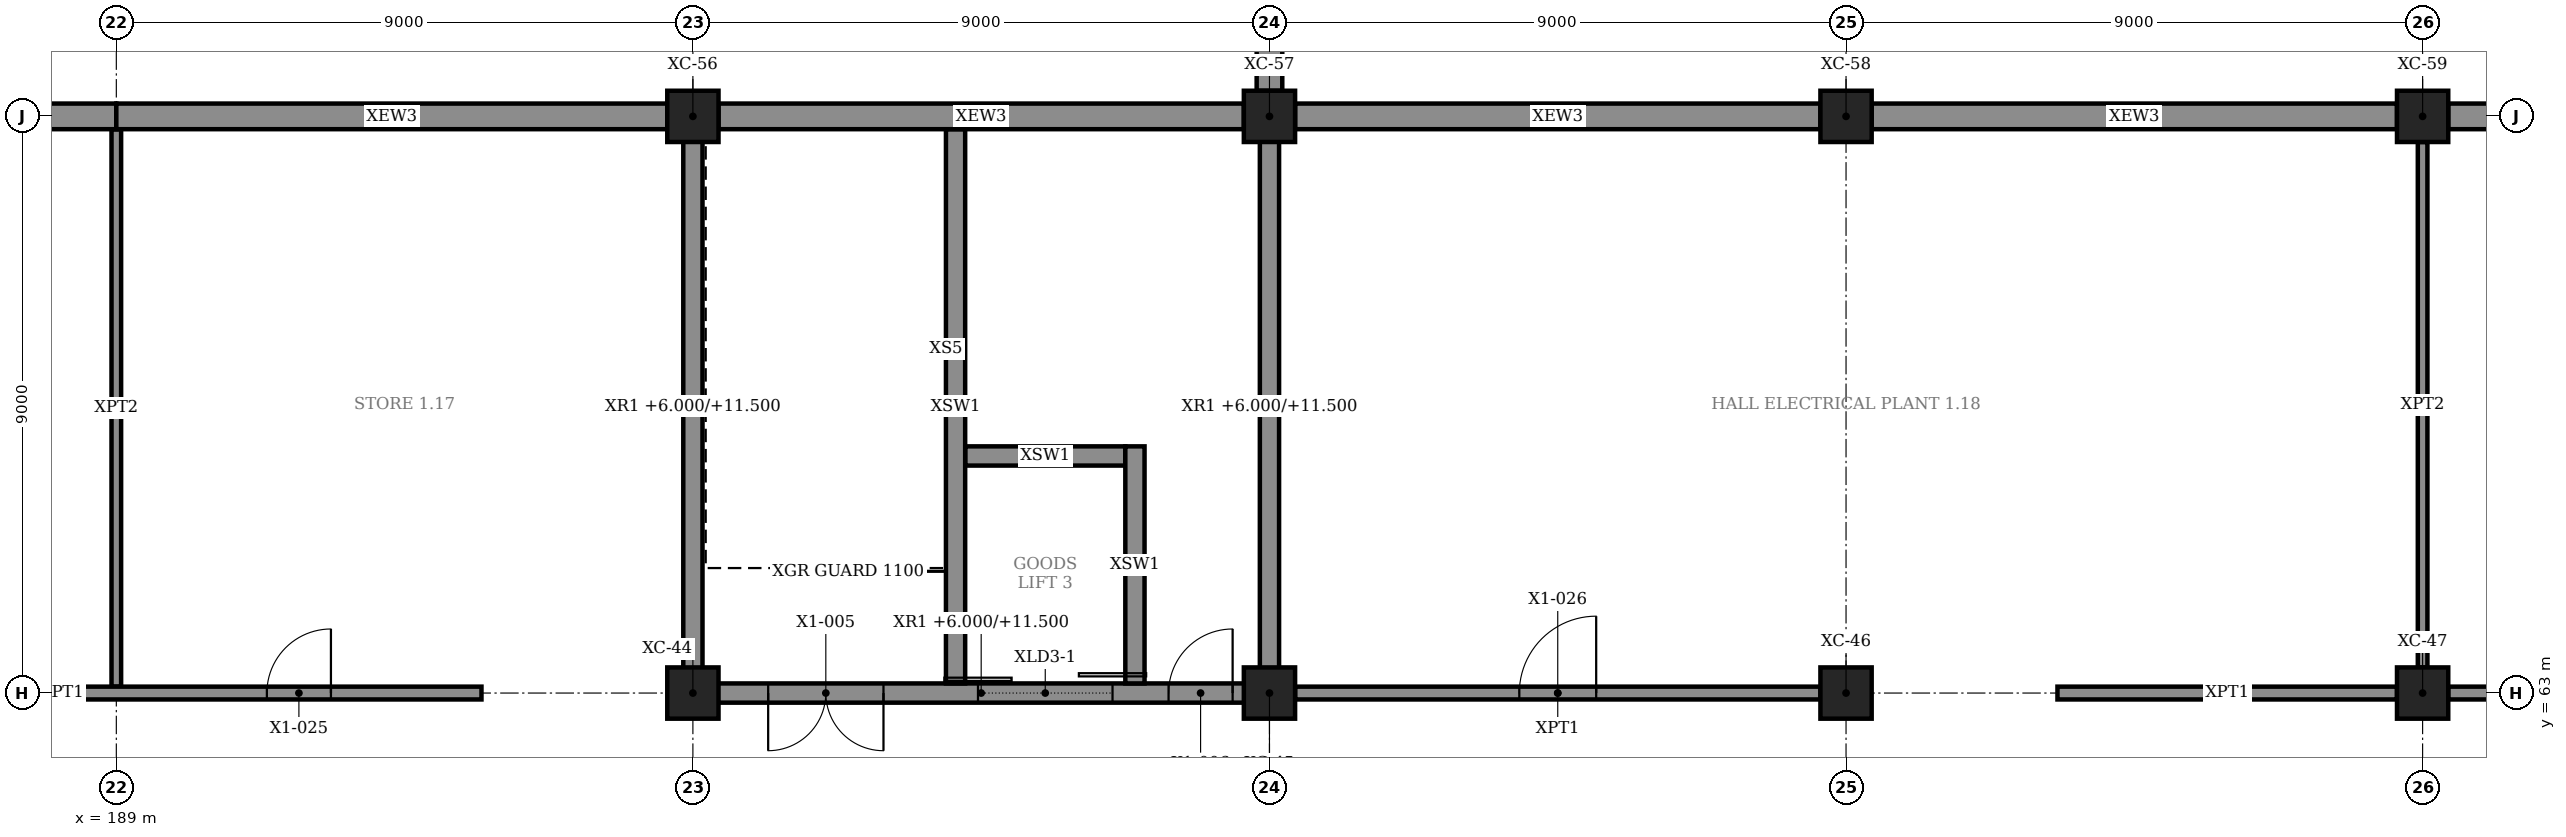
"""IFC4 building model, lengths in metres.
Left out: names, types, materials, properties, quantities, classifications, styles, units other than length and angle.
Written with IfcOpenShell. Run it as: python <this file> out.ifc"""

import sys

from ifc_helpers import new_model, si_unit, direction, frame, frame_2d, origin, origin_2d, place, context, subcontext, project, spatial, rectangle, extrude, element, fill, save


model = new_model("IFC4")
c1 = context("Model", 3, precision=1e-05, world=origin(), true_north=direction((0.0, 1.0)))
c2 = subcontext(c1, "Body", "Model", "MODEL_VIEW")
j1 = project(units=[si_unit("LENGTHUNIT", "METRE"), si_unit("PLANEANGLEUNIT", "RADIAN")], contexts=[c1])
p1 = place(None, origin())
s1 = spatial("IfcSite", under=j1, at=p1, CompositionType="ELEMENT")
p2 = place(p1, origin())
s2 = spatial("IfcBuilding", under=s1, at=p2, CompositionType="ELEMENT")
p3 = place(p2, frame((0.0, 0.0, 6.0)))
s3 = spatial("IfcBuildingStorey", under=s2, at=p3, CompositionType="ELEMENT", Elevation=6.0)
for number, where, z_axis, x_axis in (
    (1, (198.0, 63.0, 0.0), (0.0, 0.0, 1.0), (1.0, 0.0, 0.0)),
    (2, (207.0, 63.0, 0.0), (0.0, 0.0, 1.0), (1.0, 0.0, 0.0)),
    (3, (216.0, 63.0, 0.0), (0.0, 0.0, 1.0), (1.0, 0.0, 0.0)),
    (4, (225.0, 63.0, 0.0), (0.0, 0.0, 1.0), (1.0, 0.0, 0.0)),
    (5, (198.0, 72.0, 0.0), (0.0, 0.0, 1.0), (1.0, 0.0, 0.0)),
    (6, (207.0, 72.0, 0.0), (0.0, 0.0, 1.0), (1.0, 0.0, 0.0)),
    (7, (216.0, 72.0, 0.0), (0.0, 0.0, 1.0), (1.0, 0.0, 0.0)),
    (8, (225.0, 72.0, 0.0), (0.0, 0.0, 1.0), (1.0, 0.0, 0.0)),
):
    element("IfcColumn", number, at=place(p3, frame(where, z_axis=z_axis, x_axis=x_axis)), inside=s3, PredefinedType="COLUMN", context=c2, shape_type="SweptSolid", body=[
        extrude(rectangle(XDim=0.8, YDim=0.8, at=origin_2d()), origin(), (0.0, 0.0, 1.0), 5.5),
    ])
p4 = place(p3, frame((197.85, 63.0, 0.0), z_axis=(0.0, 0.0, 1.0), x_axis=(1.0, 0.0, 0.0)))
e9 = element("IfcWall", 9, at=p4, inside=s3, PredefinedType="SHEAR", context=c2, shape_type="SweptSolid", body=[
    extrude(rectangle(XDim=9.3, YDim=0.3, at=frame_2d((4.65, 0.0))), origin(), (0.0, 0.0, 1.0), 5.5),
])
p5 = place(p4, frame((1.325, 0.0, 0.0)))
e10 = element("IfcOpeningElement", 10, at=p5, cuts=e9, PredefinedType="OPENING", context=c2, shape_type="SweptSolid", body=[
    extrude(rectangle(XDim=1.8, YDim=2.4, at=frame_2d((0.9, 1.2))), frame((0.0, 0.16, 0.0), z_axis=(0.0, -1.0, 0.0), x_axis=(1.0, 0.0, 0.0)), (0.0, 0.0, 1.0), 0.32),
])
p6 = place(p4, frame((4.6, 0.0, 0.0)))
e11 = element("IfcOpeningElement", 11, at=p6, cuts=e9, PredefinedType="OPENING", context=c2, shape_type="SweptSolid", body=[
    extrude(rectangle(XDim=2.1, YDim=2.4, at=frame_2d((1.05, 1.2))), frame((0.0, 0.16, 0.0), z_axis=(0.0, -1.0, 0.0), x_axis=(1.0, 0.0, 0.0)), (0.0, 0.0, 1.0), 0.32),
])
p7 = place(p4, frame((7.575, 0.0, 0.0)))
e12 = element("IfcOpeningElement", 12, at=p7, cuts=e9, PredefinedType="OPENING", context=c2, shape_type="SweptSolid", body=[
    extrude(rectangle(XDim=1.0, YDim=2.4, at=frame_2d((0.5, 1.2))), frame((0.0, 0.16, 0.0), z_axis=(0.0, -1.0, 0.0), x_axis=(1.0, 0.0, 0.0)), (0.0, 0.0, 1.0), 0.32),
])
for number, where, z_axis, x_axis in (
    (13, (198.0, 63.15, 0.0), (0.0, 0.0, 1.0), (0.0, 1.0, 0.0)),
    (14, (207.0, 63.15, 0.0), (0.0, 0.0, 1.0), (0.0, 1.0, 0.0)),
):
    element("IfcWall", number, at=place(p3, frame(where, z_axis=z_axis, x_axis=x_axis)), inside=s3, PredefinedType="SHEAR", context=c2, shape_type="SweptSolid", body=[
        extrude(rectangle(XDim=8.65, YDim=0.3, at=frame_2d((4.325, 0.0))), origin(), (0.0, 0.0, 1.0), 5.5),
    ])
p8 = place(p3, frame((180.0, 72.0, -0.28), z_axis=(0.0, 0.0, 1.0), x_axis=(1.0, 0.0, 0.0)))
e15 = element("IfcWall", 15, at=p8, inside=s3, PredefinedType="SOLIDWALL", context=c2, shape_type="SweptSolid", body=[
    extrude(rectangle(XDim=9.0, YDim=0.4, at=frame_2d((4.5, 0.0))), origin(), (0.0, 0.0, 1.0), 5.78),
])
p9 = place(p3, frame((189.0, 72.0, -0.28), z_axis=(0.0, 0.0, 1.0), x_axis=(1.0, 0.0, 0.0)))
e16 = element("IfcWall", 16, at=p9, inside=s3, PredefinedType="SOLIDWALL", context=c2, shape_type="SweptSolid", body=[
    extrude(rectangle(XDim=8.6, YDim=0.4, at=frame_2d((4.3, 0.0))), origin(), (0.0, 0.0, 1.0), 5.78),
])
for number, where, z_axis, x_axis in (
    (17, (198.4, 72.0, -0.28), (0.0, 0.0, 1.0), (1.0, 0.0, 0.0)),
    (18, (207.4, 72.0, -0.28), (0.0, 0.0, 1.0), (1.0, 0.0, 0.0)),
    (19, (216.4, 72.0, -0.28), (0.0, 0.0, 1.0), (1.0, 0.0, 0.0)),
):
    element("IfcWall", number, at=place(p3, frame(where, z_axis=z_axis, x_axis=x_axis)), inside=s3, PredefinedType="SOLIDWALL", context=c2, shape_type="SweptSolid", body=[
        extrude(rectangle(XDim=8.2, YDim=0.4, at=frame_2d((4.1, 0.0))), origin(), (0.0, 0.0, 1.0), 5.78),
    ])
p10 = place(p3, frame((225.4, 72.0, -0.28), z_axis=(0.0, 0.0, 1.0), x_axis=(1.0, 0.0, 0.0)))
e20 = element("IfcWall", 20, at=p10, inside=s3, PredefinedType="SOLIDWALL", context=c2, shape_type="SweptSolid", body=[
    extrude(rectangle(XDim=8.6, YDim=0.4, at=frame_2d((4.3, 0.0))), origin(), (0.0, 0.0, 1.0), 5.78),
])
p11 = place(p3, frame((207.0, 72.4, 0.0), z_axis=(0.0, 0.0, 1.0), x_axis=(0.0, 1.0, 0.0)))
e21 = element("IfcWall", 21, at=p11, inside=s3, PredefinedType="SOLIDWALL", context=c2, shape_type="SweptSolid", body=[
    extrude(rectangle(XDim=8.2, YDim=0.4, at=frame_2d((4.1, 0.0))), origin(), (0.0, 0.0, 1.0), 5.5),
])
p12 = place(p3, frame((202.1, 63.15, 0.0), z_axis=(0.0, 0.0, 1.0), x_axis=(0.0, 1.0, 0.0)))
e22 = element("IfcWall", 22, at=p12, inside=s3, PredefinedType="SHEAR", context=c2, shape_type="SweptSolid", body=[
    extrude(rectangle(XDim=8.65, YDim=0.3, at=frame_2d((4.325, 0.0))), origin(), (0.0, 0.0, 1.0), 5.25),
])
p13 = place(p3, frame((204.9, 63.15, 0.0), z_axis=(0.0, 0.0, 1.0), x_axis=(0.0, 1.0, 0.0)))
e23 = element("IfcWall", 23, at=p13, inside=s3, PredefinedType="SHEAR", context=c2, shape_type="SweptSolid", body=[
    extrude(rectangle(XDim=3.7, YDim=0.3, at=frame_2d((1.85, 0.0))), origin(), (0.0, 0.0, 1.0), 5.25),
])
p14 = place(p3, frame((202.25, 66.7, 0.0), z_axis=(0.0, 0.0, 1.0), x_axis=(1.0, 0.0, 0.0)))
e24 = element("IfcWall", 24, at=p14, inside=s3, PredefinedType="SHEAR", context=c2, shape_type="SweptSolid", body=[
    extrude(rectangle(XDim=2.5, YDim=0.3, at=frame_2d((1.25, 0.0))), origin(), (0.0, 0.0, 1.0), 5.25),
])
p15 = place(p3, frame((179.85, 63.0, 0.0), z_axis=(0.0, 0.0, 1.0), x_axis=(1.0, 0.0, 0.0)))
e25 = element("IfcWall", 25, at=p15, inside=s3, PredefinedType="PARTITIONING", context=c2, shape_type="SweptSolid", body=[
    extrude(rectangle(XDim=14.85, YDim=0.2, at=frame_2d((7.425, 0.0))), origin(), (0.0, 0.0, 1.0), 5.25),
])
p16 = place(p15, frame((3.975, 0.0, 0.015)))
e26 = element("IfcOpeningElement", 26, at=p16, cuts=e25, PredefinedType="OPENING", context=c2, shape_type="SweptSolid", body=[
    extrude(rectangle(XDim=1.2, YDim=2.4, at=frame_2d((0.6, 1.2))), frame((0.0, 0.11, 0.0), z_axis=(0.0, -1.0, 0.0), x_axis=(1.0, 0.0, 0.0)), (0.0, 0.0, 1.0), 0.22),
])
p17 = place(p15, frame((11.5, 0.0, 0.015)))
e27 = element("IfcOpeningElement", 27, at=p17, cuts=e25, PredefinedType="OPENING", context=c2, shape_type="SweptSolid", body=[
    extrude(rectangle(XDim=1.0, YDim=2.4, at=frame_2d((0.5, 1.2))), frame((0.0, 0.11, 0.0), z_axis=(0.0, -1.0, 0.0), x_axis=(1.0, 0.0, 0.0)), (0.0, 0.0, 1.0), 0.22),
])
p18 = place(p3, frame((207.4, 63.0, 0.0), z_axis=(0.0, 0.0, 1.0), x_axis=(1.0, 0.0, 0.0)))
e28 = element("IfcWall", 28, at=p18, inside=s3, PredefinedType="PARTITIONING", context=c2, shape_type="SweptSolid", body=[
    extrude(rectangle(XDim=8.2, YDim=0.2, at=frame_2d((4.1, 0.0))), origin(), (0.0, 0.0, 1.0), 5.25),
])
p19 = place(p18, frame((3.5, 0.0, 0.015)))
e29 = element("IfcOpeningElement", 29, at=p19, cuts=e28, PredefinedType="OPENING", context=c2, shape_type="SweptSolid", body=[
    extrude(rectangle(XDim=1.2, YDim=2.4, at=frame_2d((0.6, 1.2))), frame((0.0, 0.11, 0.0), z_axis=(0.0, -1.0, 0.0), x_axis=(1.0, 0.0, 0.0)), (0.0, 0.0, 1.0), 0.22),
])
p20 = place(p3, frame((219.3, 63.0, 0.0), z_axis=(0.0, 0.0, 1.0), x_axis=(1.0, 0.0, 0.0)))
e30 = element("IfcWall", 30, at=p20, inside=s3, PredefinedType="PARTITIONING", context=c2, shape_type="SweptSolid", body=[
    extrude(rectangle(XDim=5.3, YDim=0.2, at=frame_2d((2.65, 0.0))), origin(), (0.0, 0.0, 1.0), 5.25),
])
p21 = place(p3, frame((225.4, 63.0, 0.0), z_axis=(0.0, 0.0, 1.0), x_axis=(1.0, 0.0, 0.0)))
e31 = element("IfcWall", 31, at=p21, inside=s3, PredefinedType="PARTITIONING", context=c2, shape_type="SweptSolid", body=[
    extrude(rectangle(XDim=26.2, YDim=0.2, at=frame_2d((13.1, 0.0))), origin(), (0.0, 0.0, 1.0), 5.25),
])
p22 = place(p21, frame((8.2, 0.0, 0.015)))
e32 = element("IfcOpeningElement", 32, at=p22, cuts=e31, PredefinedType="OPENING", context=c2, shape_type="SweptSolid", body=[
    extrude(rectangle(XDim=1.2, YDim=2.4, at=frame_2d((0.6, 1.2))), frame((0.0, 0.11, 0.0), z_axis=(0.0, -1.0, 0.0), x_axis=(1.0, 0.0, 0.0)), (0.0, 0.0, 1.0), 0.22),
])
p23 = place(p21, frame((21.4, 0.0, 0.015)))
e33 = element("IfcOpeningElement", 33, at=p23, cuts=e31, PredefinedType="OPENING", context=c2, shape_type="SweptSolid", body=[
    extrude(rectangle(XDim=1.0, YDim=2.4, at=frame_2d((0.5, 1.2))), frame((0.0, 0.11, 0.0), z_axis=(0.0, -1.0, 0.0), x_axis=(1.0, 0.0, 0.0)), (0.0, 0.0, 1.0), 0.22),
])
p24 = place(p3, frame((189.0, 63.1, 0.0), z_axis=(0.0, 0.0, 1.0), x_axis=(0.0, 1.0, 0.0)))
e34 = element("IfcWall", 34, at=p24, inside=s3, PredefinedType="PARTITIONING", context=c2, shape_type="SweptSolid", body=[
    extrude(rectangle(XDim=8.7, YDim=0.15, at=frame_2d((4.35, 0.0))), origin(), (0.0, 0.0, 1.0), 5.25),
])
p25 = place(p3, frame((225.0, 63.4, 0.0), z_axis=(0.0, 0.0, 1.0), x_axis=(0.0, 1.0, 0.0)))
e35 = element("IfcWall", 35, at=p25, inside=s3, PredefinedType="PARTITIONING", context=c2, shape_type="SweptSolid", body=[
    extrude(rectangle(XDim=8.2, YDim=0.15, at=frame_2d((4.1, 0.0))), origin(), (0.0, 0.0, 1.0), 5.25),
])
p26 = place(p5, frame((1.8, 0.0, 0.0), z_axis=(0.0, 0.0, 1.0), x_axis=(-1.0, 0.0, 0.0)))
e36 = element("IfcDoor", 36, at=p26, inside=s3, OperationType="DOUBLE_DOOR_SINGLE_SWING", PredefinedType="DOOR", context=c2, shape_type="SweptSolid", body=[
    extrude(rectangle(XDim=1.8, YDim=2.4, at=frame_2d((0.9, 1.2))), frame((0.0, 0.025, 0.0), z_axis=(0.0, -1.0, 0.0), x_axis=(1.0, 0.0, 0.0)), (0.0, 0.0, 1.0), 0.05),
])
fill(e10, e36)
p27 = place(p6, origin())
e37 = element("IfcDoor", 37, at=p27, inside=s3, OperationType="DOUBLE_DOOR_SLIDING", PredefinedType="DOOR", context=c2, shape_type="SweptSolid", body=[
    extrude(rectangle(XDim=2.1, YDim=2.4, at=frame_2d((1.05, 1.2))), frame((0.0, 0.025, 0.0), z_axis=(0.0, -1.0, 0.0), x_axis=(1.0, 0.0, 0.0)), (0.0, 0.0, 1.0), 0.05),
])
fill(e11, e37)
p28 = place(p7, origin())
e38 = element("IfcDoor", 38, at=p28, inside=s3, OperationType="SINGLE_SWING_RIGHT", PredefinedType="DOOR", context=c2, shape_type="SweptSolid", body=[
    extrude(rectangle(XDim=1.0, YDim=2.4, at=frame_2d((0.5, 1.2))), frame((0.0, 0.025, 0.0), z_axis=(0.0, -1.0, 0.0), x_axis=(1.0, 0.0, 0.0)), (0.0, 0.0, 1.0), 0.05),
])
fill(e12, e38)
p29 = place(p17, origin())
e39 = element("IfcDoor", 39, at=p29, inside=s3, OperationType="SINGLE_SWING_RIGHT", PredefinedType="DOOR", context=c2, shape_type="SweptSolid", body=[
    extrude(rectangle(XDim=1.0, YDim=2.4, at=frame_2d((0.5, 1.2))), frame((0.0, 0.025, 0.0), z_axis=(0.0, -1.0, 0.0), x_axis=(1.0, 0.0, 0.0)), (0.0, 0.0, 1.0), 0.05),
])
fill(e27, e39)
p30 = place(p19, origin())
e40 = element("IfcDoor", 40, at=p30, inside=s3, OperationType="SINGLE_SWING_RIGHT", PredefinedType="DOOR", context=c2, shape_type="SweptSolid", body=[
    extrude(rectangle(XDim=1.2, YDim=2.4, at=frame_2d((0.6, 1.2))), frame((0.0, 0.025, 0.0), z_axis=(0.0, -1.0, 0.0), x_axis=(1.0, 0.0, 0.0)), (0.0, 0.0, 1.0), 0.05),
])
fill(e29, e40)
save(model, sys.argv[1])
